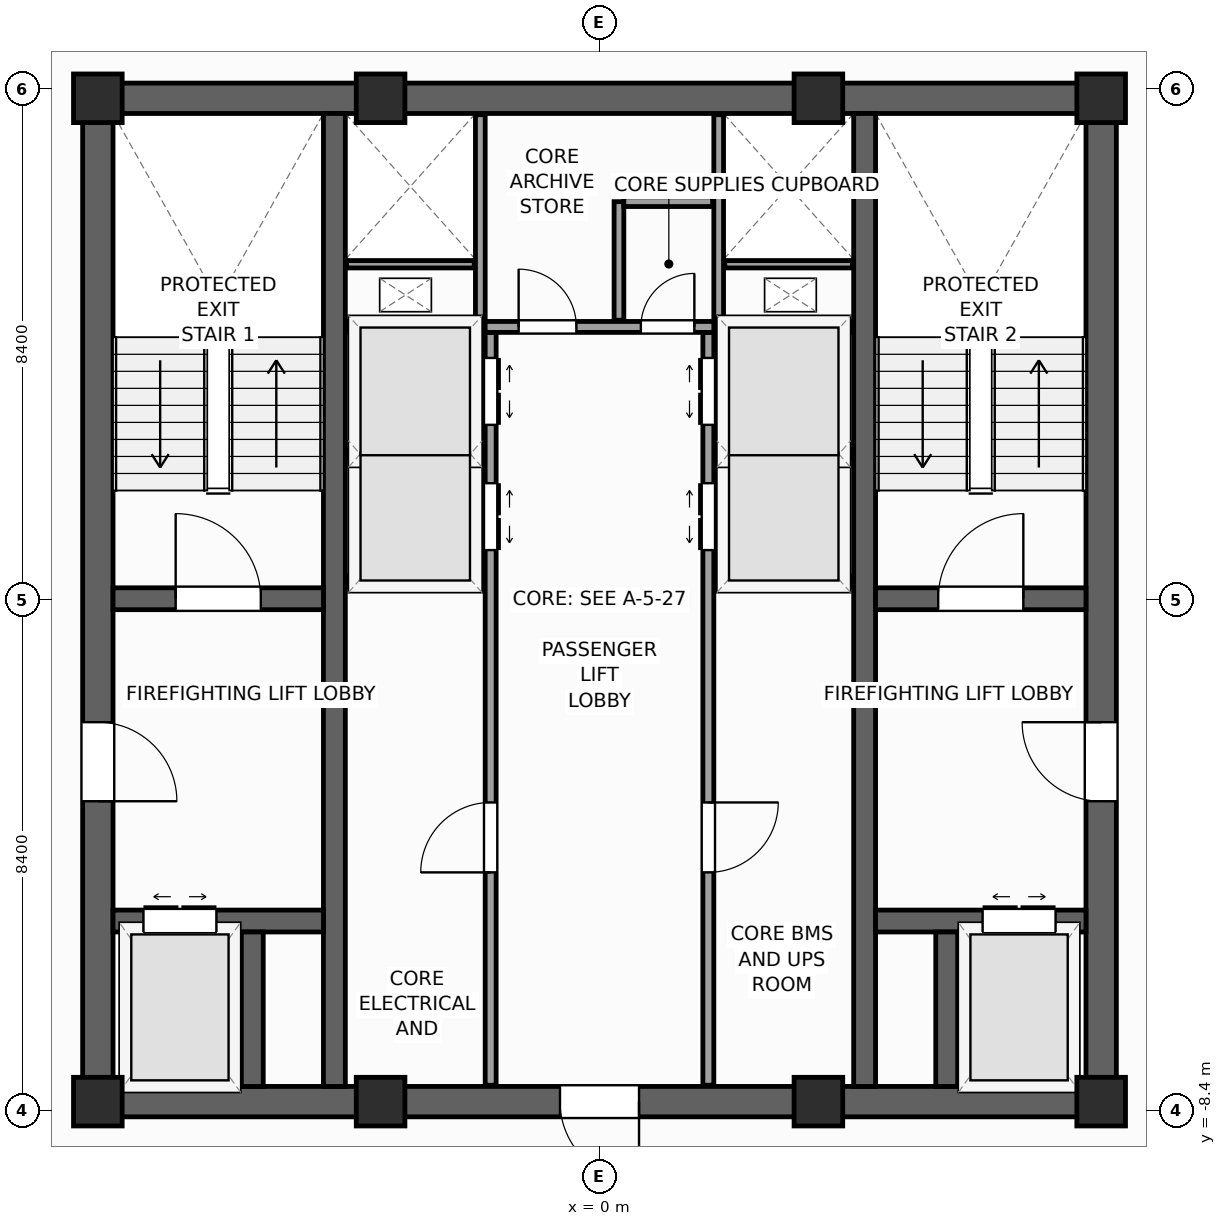
"""IFC4 building model, lengths in metres.
Left out: names, types, materials, properties, quantities, classifications, styles, units other than length and angle.
Written with IfcOpenShell. Run it as: python <this file> out.ifc"""

import sys

from ifc_helpers import new_model, si_unit, direction, frame, frame_2d, origin, origin_2d, place, context, subcontext, project, spatial, rectangle, extrude, source, transform, mapped, element, fill, save


model = new_model("IFC4")
c1 = context("Model", 3, precision=1e-05, world=origin(), true_north=direction((0.0, 1.0)))
c2 = subcontext(c1, "Body", "Model", "MODEL_VIEW")
j1 = project(units=[si_unit("LENGTHUNIT", "METRE"), si_unit("PLANEANGLEUNIT", "RADIAN")], contexts=[c1])
p1 = place(None, origin())
s1 = spatial("IfcSite", under=j1, at=p1, CompositionType="ELEMENT")
p2 = place(p1, origin())
s2 = spatial("IfcBuilding", under=s1, at=p2, CompositionType="ELEMENT")
p3 = place(p2, frame((0.0, 0.0, 286.8)))
s3 = spatial("IfcBuildingStorey", under=s2, at=p3, CompositionType="ELEMENT", Elevation=286.8)
p4 = place(p3, frame((-8.5, -8.25, 0.0), z_axis=(0.0, 0.0, 1.0), x_axis=(1.0, 0.0, 0.0)))
e1 = element("IfcWall", 1, at=p4, inside=s3, PredefinedType="SHEAR", context=c2, shape_type="SweptSolid", body=[
    extrude(rectangle(XDim=17.0, YDim=0.5, at=frame_2d((8.5, 0.0))), origin(), (0.0, 0.0, 1.0), 3.6),
])
p5 = place(p4, frame((7.85, 0.0, 0.0)))
e2 = element("IfcOpeningElement", 2, at=p5, cuts=e1, PredefinedType="OPENING", context=c2, shape_type="SweptSolid", body=[
    extrude(rectangle(XDim=1.3, YDim=2.2, at=frame_2d((0.65, 1.1))), frame((0.0, 0.26, 0.0), z_axis=(0.0, -1.0, 0.0), x_axis=(1.0, 0.0, 0.0)), (0.0, 0.0, 1.0), 0.52),
])
p6 = place(p3, frame((-8.5, 8.25, 0.0), z_axis=(0.0, 0.0, 1.0), x_axis=(1.0, 0.0, 0.0)))
e3 = element("IfcWall", 3, at=p6, inside=s3, PredefinedType="SHEAR", context=c2, shape_type="SweptSolid", body=[
    extrude(rectangle(XDim=17.0, YDim=0.5, at=frame_2d((8.5, 0.0))), origin(), (0.0, 0.0, 1.0), 3.6),
])
p7 = place(p3, frame((-8.25, -8.0, 0.0), z_axis=(0.0, 0.0, 1.0), x_axis=(0.0, 1.0, 0.0)))
e4 = element("IfcWall", 4, at=p7, inside=s3, PredefinedType="SHEAR", context=c2, shape_type="SweptSolid", body=[
    extrude(rectangle(XDim=16.0, YDim=0.5, at=frame_2d((8.0, 0.0))), origin(), (0.0, 0.0, 1.0), 3.6),
])
p8 = place(p7, frame((4.69, 0.0, 0.0)))
e5 = element("IfcOpeningElement", 5, at=p8, cuts=e4, PredefinedType="OPENING", context=c2, shape_type="SweptSolid", body=[
    extrude(rectangle(XDim=1.3, YDim=2.2, at=frame_2d((0.65, 1.1))), frame((0.0, 0.26, 0.0), z_axis=(0.0, -1.0, 0.0), x_axis=(1.0, 0.0, 0.0)), (0.0, 0.0, 1.0), 0.52),
])
p9 = place(p3, frame((8.25, -8.0, 0.0), z_axis=(0.0, 0.0, 1.0), x_axis=(0.0, 1.0, 0.0)))
e6 = element("IfcWall", 6, at=p9, inside=s3, PredefinedType="SHEAR", context=c2, shape_type="SweptSolid", body=[
    extrude(rectangle(XDim=16.0, YDim=0.5, at=frame_2d((8.0, 0.0))), origin(), (0.0, 0.0, 1.0), 3.6),
])
p10 = place(p9, frame((4.69, 0.0, 0.0)))
e7 = element("IfcOpeningElement", 7, at=p10, cuts=e6, PredefinedType="OPENING", context=c2, shape_type="SweptSolid", body=[
    extrude(rectangle(XDim=1.3, YDim=2.2, at=frame_2d((0.65, 1.1))), frame((0.0, 0.26, 0.0), z_axis=(0.0, -1.0, 0.0), x_axis=(1.0, 0.0, 0.0)), (0.0, 0.0, 1.0), 0.52),
])
for number, where, z_axis, x_axis in (
    (8, (-4.36, -8.0, 0.0), (0.0, 0.0, 1.0), (0.0, 1.0, 0.0)),
    (9, (4.36, -8.0, 0.0), (0.0, 0.0, 1.0), (0.0, 1.0, 0.0)),
):
    element("IfcWall", number, at=place(p3, frame(where, z_axis=z_axis, x_axis=x_axis)), inside=s3, PredefinedType="SHEAR", context=c2, shape_type="SweptSolid", body=[
        extrude(rectangle(XDim=16.0, YDim=0.36, at=frame_2d((8.0, 0.0))), origin(), (0.0, 0.0, 1.0), 3.6),
    ])
p11 = place(p3, frame((-8.0, 0.02, 0.0), z_axis=(0.0, 0.0, 1.0), x_axis=(1.0, 0.0, 0.0)))
e10 = element("IfcWall", 10, at=p11, inside=s3, PredefinedType="SHEAR", context=c2, shape_type="SweptSolid", body=[
    extrude(rectangle(XDim=3.46, YDim=0.36, at=frame_2d((1.73, 0.0))), origin(), (0.0, 0.0, 1.0), 3.6),
])
p12 = place(p11, frame((1.03, 0.0, 0.0)))
e11 = element("IfcOpeningElement", 11, at=p12, cuts=e10, PredefinedType="OPENING", context=c2, shape_type="SweptSolid", body=[
    extrude(rectangle(XDim=1.4, YDim=2.2, at=frame_2d((0.7, 1.1))), frame((0.0, 0.19, 0.0), z_axis=(0.0, -1.0, 0.0), x_axis=(1.0, 0.0, 0.0)), (0.0, 0.0, 1.0), 0.38),
])
p13 = place(p3, frame((4.54, 0.02, 0.0), z_axis=(0.0, 0.0, 1.0), x_axis=(1.0, 0.0, 0.0)))
e12 = element("IfcWall", 12, at=p13, inside=s3, PredefinedType="SHEAR", context=c2, shape_type="SweptSolid", body=[
    extrude(rectangle(XDim=3.46, YDim=0.36, at=frame_2d((1.73, 0.0))), origin(), (0.0, 0.0, 1.0), 3.6),
])
p14 = place(p13, frame((1.03, 0.0, 0.0)))
e13 = element("IfcOpeningElement", 13, at=p14, cuts=e12, PredefinedType="OPENING", context=c2, shape_type="SweptSolid", body=[
    extrude(rectangle(XDim=1.4, YDim=2.2, at=frame_2d((0.7, 1.1))), frame((0.0, 0.19, 0.0), z_axis=(0.0, -1.0, 0.0), x_axis=(1.0, 0.0, 0.0)), (0.0, 0.0, 1.0), 0.38),
])
p15 = place(p3, frame((-8.0, -5.28, 0.0), z_axis=(0.0, 0.0, 1.0), x_axis=(1.0, 0.0, 0.0)))
e14 = element("IfcWall", 14, at=p15, inside=s3, PredefinedType="SHEAR", context=c2, shape_type="SweptSolid", body=[
    extrude(rectangle(XDim=3.46, YDim=0.36, at=frame_2d((1.73, 0.0))), origin(), (0.0, 0.0, 1.0), 3.6),
])
p16 = place(p15, frame((0.5, 0.0, 0.0)))
e15 = element("IfcOpeningElement", 15, at=p16, cuts=e14, PredefinedType="OPENING", context=c2, shape_type="SweptSolid", body=[
    extrude(rectangle(XDim=1.2, YDim=2.25, at=frame_2d((0.6, 1.125))), frame((0.0, 0.19, 0.0), z_axis=(0.0, -1.0, 0.0), x_axis=(1.0, 0.0, 0.0)), (0.0, 0.0, 1.0), 0.38),
])
p17 = place(p3, frame((4.54, -5.28, 0.0), z_axis=(0.0, 0.0, 1.0), x_axis=(1.0, 0.0, 0.0)))
e16 = element("IfcWall", 16, at=p17, inside=s3, PredefinedType="SHEAR", context=c2, shape_type="SweptSolid", body=[
    extrude(rectangle(XDim=3.46, YDim=0.36, at=frame_2d((1.73, 0.0))), origin(), (0.0, 0.0, 1.0), 3.6),
])
p18 = place(p17, frame((1.76, 0.0, 0.0)))
e17 = element("IfcOpeningElement", 17, at=p18, cuts=e16, PredefinedType="OPENING", context=c2, shape_type="SweptSolid", body=[
    extrude(rectangle(XDim=1.2, YDim=2.25, at=frame_2d((0.6, 1.125))), frame((0.0, 0.19, 0.0), z_axis=(0.0, -1.0, 0.0), x_axis=(1.0, 0.0, 0.0)), (0.0, 0.0, 1.0), 0.38),
])
for number, where, z_axis, x_axis in (
    (18, (-5.71, -8.0, 0.0), (0.0, 0.0, 1.0), (0.0, 1.0, 0.0)),
    (19, (5.71, -8.0, 0.0), (0.0, 0.0, 1.0), (0.0, 1.0, 0.0)),
):
    element("IfcWall", number, at=place(p3, frame(where, z_axis=z_axis, x_axis=x_axis)), inside=s3, PredefinedType="SHEAR", context=c2, shape_type="SweptSolid", body=[
        extrude(rectangle(XDim=2.54, YDim=0.36, at=frame_2d((1.27, 0.0))), origin(), (0.0, 0.0, 1.0), 3.6),
    ])
m1 = source(origin(), c2, "Body", "SweptSolid", [
    extrude(rectangle(XDim=0.8, YDim=0.8, at=origin_2d()), origin(), (0.0, 0.0, 1.0), 3.6),
])
for number, where, z_axis, x_axis in (
    (20, (-8.25, -8.25, 0.0), (0.0, 0.0, 1.0), (1.0, 0.0, 0.0)),
    (21, (8.25, -8.25, 0.0), (0.0, 0.0, 1.0), (1.0, 0.0, 0.0)),
    (22, (8.25, 8.25, 0.0), (0.0, 0.0, 1.0), (1.0, 0.0, 0.0)),
    (23, (-8.25, 8.25, 0.0), (0.0, 0.0, 1.0), (1.0, 0.0, 0.0)),
    (24, (-3.6, -8.25, 0.0), (0.0, 0.0, 1.0), (1.0, 0.0, 0.0)),
    (25, (3.6, -8.25, 0.0), (0.0, 0.0, 1.0), (1.0, 0.0, 0.0)),
    (26, (-3.6, 8.25, 0.0), (0.0, 0.0, 1.0), (1.0, 0.0, 0.0)),
    (27, (3.6, 8.25, 0.0), (0.0, 0.0, 1.0), (1.0, 0.0, 0.0)),
):
    element("IfcColumn", number, at=place(p3, frame(where, z_axis=z_axis, x_axis=x_axis)), inside=s3, PredefinedType="PILASTER", context=c2, shape_type="MappedRepresentation", body=[
        mapped(m1, transform((0.0, 0.0, 0.0), scale=1.0)),
    ])
p19 = place(p3, frame((-1.79, -7.98, 0.0), z_axis=(0.0, 0.0, 1.0), x_axis=(0.0, 1.0, 0.0)))
e28 = element("IfcWall", 28, at=p19, inside=s3, PredefinedType="PARTITIONING", context=c2, shape_type="SweptSolid", body=[
    extrude(rectangle(XDim=12.38, YDim=0.18, at=frame_2d((6.19, 0.0))), origin(), (0.0, 0.0, 1.0), 3.35),
])
p20 = place(p19, frame((8.8, 0.0, 0.0)))
e29 = element("IfcOpeningElement", 29, at=p20, cuts=e28, PredefinedType="OPENING", context=c2, shape_type="SweptSolid", body=[
    extrude(rectangle(XDim=1.1, YDim=2.2, at=frame_2d((0.55, 1.1))), frame((0.0, 0.1, 0.0), z_axis=(0.0, -1.0, 0.0), x_axis=(1.0, 0.0, 0.0)), (0.0, 0.0, 1.0), 0.2),
])
p21 = place(p19, frame((10.86, 0.0, 0.0)))
e30 = element("IfcOpeningElement", 30, at=p21, cuts=e28, PredefinedType="OPENING", context=c2, shape_type="SweptSolid", body=[
    extrude(rectangle(XDim=1.1, YDim=2.2, at=frame_2d((0.55, 1.1))), frame((0.0, 0.1, 0.0), z_axis=(0.0, -1.0, 0.0), x_axis=(1.0, 0.0, 0.0)), (0.0, 0.0, 1.0), 0.2),
])
p22 = place(p19, frame((3.5, 0.0, 0.0)))
e31 = element("IfcOpeningElement", 31, at=p22, cuts=e28, PredefinedType="OPENING", context=c2, shape_type="SweptSolid", body=[
    extrude(rectangle(XDim=1.15, YDim=2.25, at=frame_2d((0.575, 1.125))), frame((0.0, 0.1, 0.0), z_axis=(0.0, -1.0, 0.0), x_axis=(1.0, 0.0, 0.0)), (0.0, 0.0, 1.0), 0.2),
])
p23 = place(p3, frame((1.79, -7.98, 0.0), z_axis=(0.0, 0.0, 1.0), x_axis=(0.0, 1.0, 0.0)))
e32 = element("IfcWall", 32, at=p23, inside=s3, PredefinedType="PARTITIONING", context=c2, shape_type="SweptSolid", body=[
    extrude(rectangle(XDim=12.38, YDim=0.18, at=frame_2d((6.19, 0.0))), origin(), (0.0, 0.0, 1.0), 3.35),
])
p24 = place(p23, frame((8.8, 0.0, 0.0)))
e33 = element("IfcOpeningElement", 33, at=p24, cuts=e32, PredefinedType="OPENING", context=c2, shape_type="SweptSolid", body=[
    extrude(rectangle(XDim=1.1, YDim=2.2, at=frame_2d((0.55, 1.1))), frame((0.0, 0.1, 0.0), z_axis=(0.0, -1.0, 0.0), x_axis=(1.0, 0.0, 0.0)), (0.0, 0.0, 1.0), 0.2),
])
p25 = place(p23, frame((10.86, 0.0, 0.0)))
e34 = element("IfcOpeningElement", 34, at=p25, cuts=e32, PredefinedType="OPENING", context=c2, shape_type="SweptSolid", body=[
    extrude(rectangle(XDim=1.1, YDim=2.2, at=frame_2d((0.55, 1.1))), frame((0.0, 0.1, 0.0), z_axis=(0.0, -1.0, 0.0), x_axis=(1.0, 0.0, 0.0)), (0.0, 0.0, 1.0), 0.2),
])
p26 = place(p23, frame((3.5, 0.0, 0.0)))
e35 = element("IfcOpeningElement", 35, at=p26, cuts=e32, PredefinedType="OPENING", context=c2, shape_type="SweptSolid", body=[
    extrude(rectangle(XDim=1.15, YDim=2.25, at=frame_2d((0.575, 1.125))), frame((0.0, 0.1, 0.0), z_axis=(0.0, -1.0, 0.0), x_axis=(1.0, 0.0, 0.0)), (0.0, 0.0, 1.0), 0.2),
])
p27 = place(p3, frame((-1.88, 4.49, 0.0), z_axis=(0.0, 0.0, 1.0), x_axis=(1.0, 0.0, 0.0)))
e36 = element("IfcWall", 36, at=p27, inside=s3, PredefinedType="PARTITIONING", context=c2, shape_type="SweptSolid", body=[
    extrude(rectangle(XDim=3.76, YDim=0.18, at=frame_2d((1.88, 0.0))), origin(), (0.0, 0.0, 1.0), 3.35),
])
p28 = place(p27, frame((0.55, 0.0, 0.0)))
e37 = element("IfcOpeningElement", 37, at=p28, cuts=e36, PredefinedType="OPENING", context=c2, shape_type="SweptSolid", body=[
    extrude(rectangle(XDim=0.95, YDim=2.1, at=frame_2d((0.475, 1.05))), frame((0.0, 0.1, 0.0), z_axis=(0.0, -1.0, 0.0), x_axis=(1.0, 0.0, 0.0)), (0.0, 0.0, 1.0), 0.2),
])
p29 = place(p27, frame((2.56, 0.0, 0.0)))
e38 = element("IfcOpeningElement", 38, at=p29, cuts=e36, PredefinedType="OPENING", context=c2, shape_type="SweptSolid", body=[
    extrude(rectangle(XDim=0.88, YDim=2.1, at=frame_2d((0.44, 1.05))), frame((0.0, 0.1, 0.0), z_axis=(0.0, -1.0, 0.0), x_axis=(1.0, 0.0, 0.0)), (0.0, 0.0, 1.0), 0.2),
])
for number, where, z_axis, x_axis in (
    (39, (-4.17, 0.3, 0.0), (0.0, 0.0, 1.0), (1.0, 0.0, 0.0)),
    (40, (1.89, 0.3, 0.0), (0.0, 0.0, 1.0), (1.0, 0.0, 0.0)),
    (41, (-4.17, 4.49, 0.0), (0.0, 0.0, 1.0), (1.0, 0.0, 0.0)),
    (42, (1.89, 4.49, 0.0), (0.0, 0.0, 1.0), (1.0, 0.0, 0.0)),
):
    element("IfcWall", number, at=place(p3, frame(where, z_axis=z_axis, x_axis=x_axis)), inside=s3, PredefinedType="PARTITIONING", context=c2, shape_type="SweptSolid", body=[
        extrude(rectangle(XDim=2.28, YDim=0.18, at=frame_2d((1.14, 0.0))), origin(), (0.0, 0.0, 1.0), 3.35),
    ])
for number, where, z_axis, x_axis in (
    (43, (-4.16, 2.4, 0.0), (0.0, 0.0, 1.0), (1.0, 0.0, 0.0)),
    (44, (1.9, 2.4, 0.0), (0.0, 0.0, 1.0), (1.0, 0.0, 0.0)),
):
    element("IfcWall", number, at=place(p3, frame(where, z_axis=z_axis, x_axis=x_axis)), inside=s3, PredefinedType="PARTITIONING", context=c2, shape_type="SweptSolid", body=[
        extrude(rectangle(XDim=2.26, YDim=0.12, at=frame_2d((1.13, 0.0))), origin(), (0.0, 0.0, 1.0), 3.35),
    ])
for number, where, z_axis, x_axis in (
    (45, (-1.96, 4.58, 0.0), (0.0, 0.0, 1.0), (0.0, 1.0, 0.0)),
    (46, (1.96, 4.58, 0.0), (0.0, 0.0, 1.0), (0.0, 1.0, 0.0)),
):
    element("IfcWall", number, at=place(p3, frame(where, z_axis=z_axis, x_axis=x_axis)), inside=s3, PredefinedType="PARTITIONING", context=c2, shape_type="SweptSolid", body=[
        extrude(rectangle(XDim=3.4, YDim=0.16, at=frame_2d((1.7, 0.0))), origin(), (0.0, 0.0, 1.0), 3.35),
    ])
for number, where, z_axis, x_axis in (
    (47, (-4.16, 5.52, 0.0), (0.0, 0.0, 1.0), (1.0, 0.0, 0.0)),
    (48, (2.06, 5.52, 0.0), (0.0, 0.0, 1.0), (1.0, 0.0, 0.0)),
):
    element("IfcWall", number, at=place(p3, frame(where, z_axis=z_axis, x_axis=x_axis)), inside=s3, PredefinedType="PARTITIONING", context=c2, shape_type="SweptSolid", body=[
        extrude(rectangle(XDim=2.1, YDim=0.12, at=frame_2d((1.05, 0.0))), origin(), (0.0, 0.0, 1.0), 3.35),
    ])
p30 = place(p3, frame((0.32, 4.6, 0.0), z_axis=(0.0, 0.0, 1.0), x_axis=(0.0, 1.0, 0.0)))
e49 = element("IfcWall", 49, at=p30, inside=s3, PredefinedType="PARTITIONING", context=c2, shape_type="SweptSolid", body=[
    extrude(rectangle(XDim=1.95, YDim=0.16, at=frame_2d((0.975, 0.0))), origin(), (0.0, 0.0, 1.0), 3.35),
])
p31 = place(p3, frame((0.4, 6.55, 0.0), z_axis=(0.0, 0.0, 1.0), x_axis=(1.0, 0.0, 0.0)))
e50 = element("IfcWall", 50, at=p31, inside=s3, PredefinedType="PARTITIONING", context=c2, shape_type="SweptSolid", body=[
    extrude(rectangle(XDim=1.46, YDim=0.16, at=frame_2d((0.73, 0.0))), origin(), (0.0, 0.0, 1.0), 3.35),
])
m2 = source(origin(), c2, "Body", "SweptSolid", [
    extrude(rectangle(XDim=1.4, YDim=2.2, at=frame_2d((0.7, 1.1))), frame((0.0, 0.025, 0.0), z_axis=(0.0, -1.0, 0.0), x_axis=(1.0, 0.0, 0.0)), (0.0, 0.0, 1.0), 0.05),
])
p32 = place(p12, origin())
e51 = element("IfcDoor", 51, at=p32, inside=s3, OperationType="SINGLE_SWING_LEFT", PredefinedType="DOOR", context=c2, shape_type="MappedRepresentation", body=[
    mapped(m2, transform((0.0, 0.0, 0.0), scale=1.0)),
])
fill(e11, e51)
p33 = place(p14, origin())
e52 = element("IfcDoor", 52, at=p33, inside=s3, OperationType="SINGLE_SWING_RIGHT", PredefinedType="DOOR", context=c2, shape_type="MappedRepresentation", body=[
    mapped(m2, transform((0.0, 0.0, 0.0), scale=1.0)),
])
fill(e13, e52)
m3 = source(origin(), c2, "Body", "SweptSolid", [
    extrude(rectangle(XDim=1.3, YDim=2.2, at=frame_2d((0.65, 1.1))), frame((0.0, 0.025, 0.0), z_axis=(0.0, -1.0, 0.0), x_axis=(1.0, 0.0, 0.0)), (0.0, 0.0, 1.0), 0.05),
])
p34 = place(p8, frame((1.3, 0.0, 0.0), z_axis=(0.0, 0.0, 1.0), x_axis=(-1.0, 0.0, 0.0)))
e53 = element("IfcDoor", 53, at=p34, inside=s3, OperationType="SINGLE_SWING_LEFT", PredefinedType="DOOR", context=c2, shape_type="MappedRepresentation", body=[
    mapped(m3, transform((0.0, 0.0, 0.0), scale=1.0)),
])
fill(e5, e53)
p35 = place(p10, origin())
e54 = element("IfcDoor", 54, at=p35, inside=s3, OperationType="SINGLE_SWING_RIGHT", PredefinedType="DOOR", context=c2, shape_type="MappedRepresentation", body=[
    mapped(m3, transform((0.0, 0.0, 0.0), scale=1.0)),
])
fill(e7, e54)
p36 = place(p5, frame((1.3, 0.0, 0.0), z_axis=(0.0, 0.0, 1.0), x_axis=(-1.0, 0.0, 0.0)))
e55 = element("IfcDoor", 55, at=p36, inside=s3, OperationType="SINGLE_SWING_RIGHT", PredefinedType="DOOR", context=c2, shape_type="MappedRepresentation", body=[
    mapped(m3, transform((0.0, 0.0, 0.0), scale=1.0)),
])
fill(e2, e55)
m4 = source(origin(), c2, "Body", "SweptSolid", [
    extrude(rectangle(XDim=1.2, YDim=2.25, at=frame_2d((0.6, 1.125))), frame((0.0, 0.025, 0.0), z_axis=(0.0, -1.0, 0.0), x_axis=(1.0, 0.0, 0.0)), (0.0, 0.0, 1.0), 0.05),
])
p37 = place(p16, origin())
e56 = element("IfcDoor", 56, at=p37, inside=s3, OperationType="DOUBLE_DOOR_SLIDING", PredefinedType="DOOR", context=c2, shape_type="MappedRepresentation", body=[
    mapped(m4, transform((0.0, 0.0, 0.0), scale=1.0)),
])
fill(e15, e56)
p38 = place(p18, origin())
e57 = element("IfcDoor", 57, at=p38, inside=s3, OperationType="DOUBLE_DOOR_SLIDING", PredefinedType="DOOR", context=c2, shape_type="MappedRepresentation", body=[
    mapped(m4, transform((0.0, 0.0, 0.0), scale=1.0)),
])
fill(e17, e57)
m5 = source(origin(), c2, "Body", "SweptSolid", [
    extrude(rectangle(XDim=1.1, YDim=2.2, at=frame_2d((0.55, 1.1))), frame((0.0, 0.025, 0.0), z_axis=(0.0, -1.0, 0.0), x_axis=(1.0, 0.0, 0.0)), (0.0, 0.0, 1.0), 0.05),
])
p39 = place(p20, frame((1.1, 0.0, 0.0), z_axis=(0.0, 0.0, 1.0), x_axis=(-1.0, 0.0, 0.0)))
e58 = element("IfcDoor", 58, at=p39, inside=s3, OperationType="DOUBLE_DOOR_SLIDING", PredefinedType="DOOR", context=c2, shape_type="MappedRepresentation", body=[
    mapped(m5, transform((0.0, 0.0, 0.0), scale=1.0)),
])
fill(e29, e58)
p40 = place(p21, frame((1.1, 0.0, 0.0), z_axis=(0.0, 0.0, 1.0), x_axis=(-1.0, 0.0, 0.0)))
e59 = element("IfcDoor", 59, at=p40, inside=s3, OperationType="DOUBLE_DOOR_SLIDING", PredefinedType="DOOR", context=c2, shape_type="MappedRepresentation", body=[
    mapped(m5, transform((0.0, 0.0, 0.0), scale=1.0)),
])
fill(e30, e59)
p41 = place(p24, origin())
e60 = element("IfcDoor", 60, at=p41, inside=s3, OperationType="DOUBLE_DOOR_SLIDING", PredefinedType="DOOR", context=c2, shape_type="MappedRepresentation", body=[
    mapped(m5, transform((0.0, 0.0, 0.0), scale=1.0)),
])
fill(e33, e60)
p42 = place(p25, origin())
e61 = element("IfcDoor", 61, at=p42, inside=s3, OperationType="DOUBLE_DOOR_SLIDING", PredefinedType="DOOR", context=c2, shape_type="MappedRepresentation", body=[
    mapped(m5, transform((0.0, 0.0, 0.0), scale=1.0)),
])
fill(e34, e61)
m6 = source(origin(), c2, "Body", "SweptSolid", [
    extrude(rectangle(XDim=1.15, YDim=2.25, at=frame_2d((0.575, 1.125))), frame((0.0, 0.025, 0.0), z_axis=(0.0, -1.0, 0.0), x_axis=(1.0, 0.0, 0.0)), (0.0, 0.0, 1.0), 0.05),
])
p43 = place(p22, origin())
e62 = element("IfcDoor", 62, at=p43, inside=s3, OperationType="SINGLE_SWING_LEFT", PredefinedType="DOOR", context=c2, shape_type="MappedRepresentation", body=[
    mapped(m6, transform((0.0, 0.0, 0.0), scale=1.0)),
])
fill(e31, e62)
p44 = place(p26, frame((1.15, 0.0, 0.0), z_axis=(0.0, 0.0, 1.0), x_axis=(-1.0, 0.0, 0.0)))
e63 = element("IfcDoor", 63, at=p44, inside=s3, OperationType="SINGLE_SWING_RIGHT", PredefinedType="DOOR", context=c2, shape_type="MappedRepresentation", body=[
    mapped(m6, transform((0.0, 0.0, 0.0), scale=1.0)),
])
fill(e35, e63)
m7 = source(origin(), c2, "Body", "SweptSolid", [
    extrude(rectangle(XDim=0.95, YDim=2.1, at=frame_2d((0.475, 1.05))), frame((0.0, 0.025, 0.0), z_axis=(0.0, -1.0, 0.0), x_axis=(1.0, 0.0, 0.0)), (0.0, 0.0, 1.0), 0.05),
])
p45 = place(p28, origin())
e64 = element("IfcDoor", 64, at=p45, inside=s3, OperationType="SINGLE_SWING_LEFT", PredefinedType="DOOR", context=c2, shape_type="MappedRepresentation", body=[
    mapped(m7, transform((0.0, 0.0, 0.0), scale=1.0)),
])
fill(e37, e64)
m8 = source(origin(), c2, "Body", "SweptSolid", [
    extrude(rectangle(XDim=0.88, YDim=2.1, at=frame_2d((0.44, 1.05))), frame((0.0, 0.025, 0.0), z_axis=(0.0, -1.0, 0.0), x_axis=(1.0, 0.0, 0.0)), (0.0, 0.0, 1.0), 0.05),
])
p46 = place(p29, origin())
e65 = element("IfcDoor", 65, at=p46, inside=s3, OperationType="SINGLE_SWING_RIGHT", PredefinedType="DOOR", context=c2, shape_type="MappedRepresentation", body=[
    mapped(m8, transform((0.0, 0.0, 0.0), scale=1.0)),
])
fill(e38, e65)
save(model, sys.argv[1])
